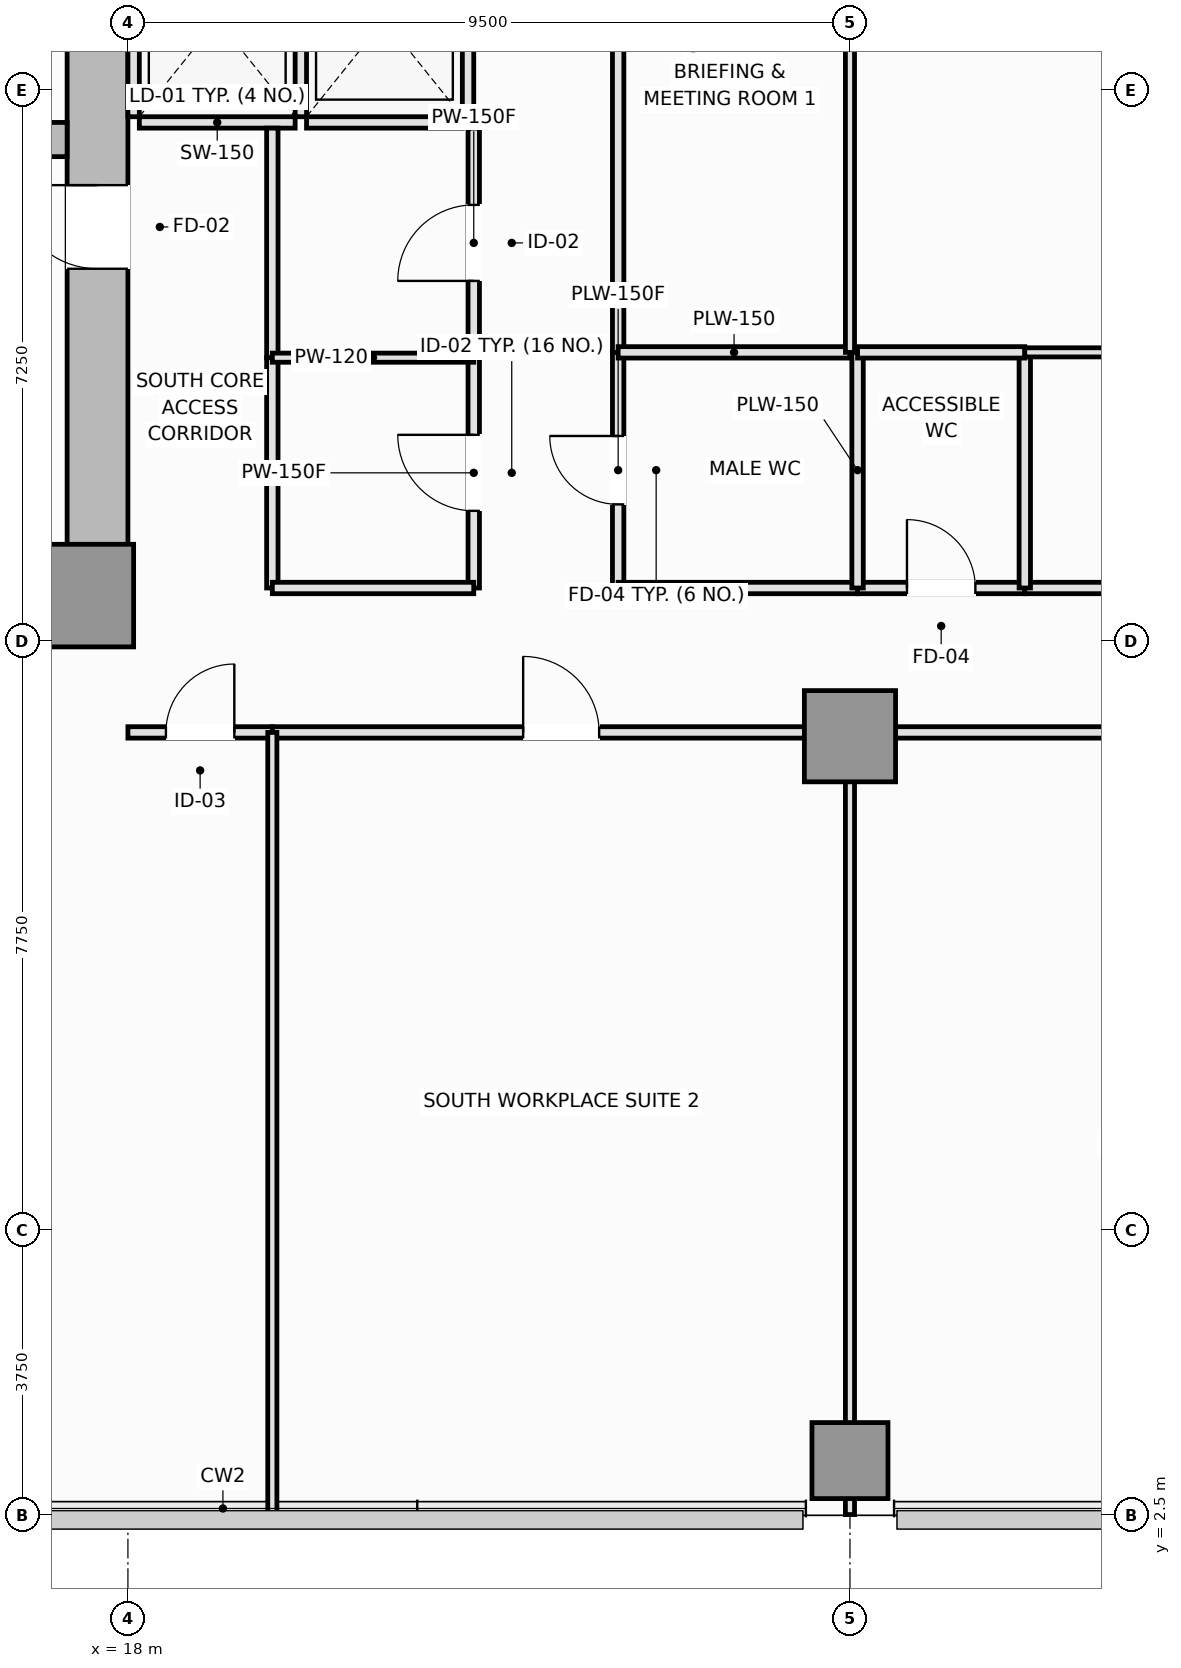
"""IFC4 building model, lengths in metres.
Left out: names, types, materials, properties, quantities, classifications, styles, units other than length and angle.
Written with IfcOpenShell. Run it as: python <this file> out.ifc"""

import sys

from ifc_helpers import new_model, si_unit, direction, frame, frame_2d, origin, origin_2d, place, context, subcontext, project, spatial, rectangle, extrude, element, fill, save


model = new_model("IFC4")
c1 = context("Model", 3, precision=1e-05, world=origin(), true_north=direction((0.0, 1.0)))
c2 = subcontext(c1, "Body", "Model", "MODEL_VIEW")
j1 = project(units=[si_unit("LENGTHUNIT", "METRE"), si_unit("PLANEANGLEUNIT", "RADIAN")], contexts=[c1])
p1 = place(None, origin())
s1 = spatial("IfcSite", under=j1, at=p1, CompositionType="ELEMENT")
p2 = place(p1, origin())
s2 = spatial("IfcBuilding", under=s1, at=p2, CompositionType="ELEMENT")
p3 = place(p2, frame((0.0, 0.0, 29.15)))
s3 = spatial("IfcBuildingStorey", under=s2, at=p3, CompositionType="ELEMENT", Elevation=29.15)
p4 = place(p3, frame((4.5, 14.4, 0.0), z_axis=(0.0, 0.0, 1.0), x_axis=(1.0, 0.0, 0.0)))
e1 = element("IfcWall", 1, at=p4, inside=s3, PredefinedType="SHEAR", context=c2, shape_type="SweptSolid", body=[
    extrude(rectangle(XDim=13.5, YDim=0.8, at=frame_2d((6.75, 0.0))), origin(), (0.0, 0.0, 1.0), 3.55),
])
p5 = place(p3, frame((17.6, 14.8, 0.0), z_axis=(0.0, 0.0, 1.0), x_axis=(0.0, 1.0, 0.0)))
e2 = element("IfcWall", 2, at=p5, inside=s3, PredefinedType="SHEAR", context=c2, shape_type="SweptSolid", body=[
    extrude(rectangle(XDim=8.65, YDim=0.8, at=frame_2d((4.325, 0.0))), origin(), (0.0, 0.0, 1.0), 3.55),
])
p6 = place(p5, frame((4.1, 0.0, 0.0)))
e3 = element("IfcOpeningElement", 3, at=p6, cuts=e2, PredefinedType="OPENING", context=c2, shape_type="SweptSolid", body=[
    extrude(rectangle(XDim=1.1, YDim=2.15, at=frame_2d((0.55, 1.075))), frame((0.0, 0.41, 0.0), z_axis=(0.0, -1.0, 0.0), x_axis=(1.0, 0.0, 0.0)), (0.0, 0.0, 1.0), 0.82),
])
p7 = place(p3, frame((5.3, 20.6, 0.0), z_axis=(0.0, 0.0, 1.0), x_axis=(1.0, 0.0, 0.0)))
e4 = element("IfcWall", 4, at=p7, inside=s3, PredefinedType="SHEAR", context=c2, shape_type="SweptSolid", body=[
    extrude(rectangle(XDim=11.9, YDim=0.45, at=frame_2d((5.95, 0.0))), origin(), (0.0, 0.0, 1.0), 3.55),
])
p8 = place(p3, frame((17.4, 14.6, 0.0), z_axis=(0.0, 0.0, 1.0), x_axis=(1.0, 0.0, 0.0)))
e5 = element("IfcColumn", 5, at=p8, inside=s3, PredefinedType="PILASTER", context=c2, shape_type="SweptSolid", body=[
    extrude(rectangle(XDim=1.35, YDim=1.35, at=origin_2d()), origin(), (0.0, 0.0, 1.0), 3.55),
])
p9 = place(p3, frame((27.5, 12.75, 0.0), z_axis=(0.0, 0.0, 1.0), x_axis=(1.0, 0.0, 0.0)))
e6 = element("IfcColumn", 6, at=p9, inside=s3, PredefinedType="COLUMN", context=c2, shape_type="SweptSolid", body=[
    extrude(rectangle(XDim=1.2, YDim=1.2, at=origin_2d()), origin(), (0.0, 0.0, 1.0), 3.55),
])
p10 = place(p3, frame((27.5, 3.22, 0.0), z_axis=(0.0, 0.0, 1.0), x_axis=(1.0, 0.0, 0.0)))
e7 = element("IfcColumn", 7, at=p10, inside=s3, PredefinedType="COLUMN", context=c2, shape_type="SweptSolid", body=[
    extrude(rectangle(XDim=1.0, YDim=1.0, at=origin_2d()), origin(), (0.0, 0.0, 1.0), 3.55),
])
p11 = place(p3, frame((18.15, 20.825, 0.0), z_axis=(0.0, 0.0, 1.0), x_axis=(1.0, 0.0, 0.0)))
e8 = element("IfcWall", 8, at=p11, inside=s3, PredefinedType="PARTITIONING", context=c2, shape_type="SweptSolid", body=[
    extrude(rectangle(XDim=2.05, YDim=0.15, at=frame_2d((1.025, 0.0))), origin(), (0.0, 0.0, 1.0), 3.37),
])
for number, where, z_axis, x_axis in (
    (9, (18.075, 20.9, 0.0), (0.0, 0.0, 1.0), (0.0, 1.0, 0.0)),
    (10, (20.275, 20.9, 0.0), (0.0, 0.0, 1.0), (0.0, 1.0, 0.0)),
):
    element("IfcWall", number, at=place(p3, frame(where, z_axis=z_axis, x_axis=x_axis)), inside=s3, PredefinedType="PARTITIONING", context=c2, shape_type="SweptSolid", body=[
        extrude(rectangle(XDim=2.55, YDim=0.15, at=frame_2d((1.275, 0.0))), origin(), (0.0, 0.0, 1.0), 3.37),
    ])
p12 = place(p3, frame((20.35, 20.825, 0.0), z_axis=(0.0, 0.0, 1.0), x_axis=(1.0, 0.0, 0.0)))
e11 = element("IfcWall", 11, at=p12, inside=s3, PredefinedType="PARTITIONING", context=c2, shape_type="SweptSolid", body=[
    extrude(rectangle(XDim=2.05, YDim=0.15, at=frame_2d((1.025, 0.0))), origin(), (0.0, 0.0, 1.0), 3.37),
])
p13 = place(p3, frame((22.475, 20.9, 0.0), z_axis=(0.0, 0.0, 1.0), x_axis=(0.0, 1.0, 0.0)))
e12 = element("IfcWall", 12, at=p13, inside=s3, PredefinedType="PARTITIONING", context=c2, shape_type="SweptSolid", body=[
    extrude(rectangle(XDim=2.55, YDim=0.15, at=frame_2d((1.275, 0.0))), origin(), (0.0, 0.0, 1.0), 3.37),
])
p14 = place(p3, frame((22.55, 14.7, 0.0), z_axis=(0.0, 0.0, 1.0), x_axis=(0.0, 1.0, 0.0)))
e13 = element("IfcWall", 13, at=p14, inside=s3, PredefinedType="PARTITIONING", context=c2, shape_type="SweptSolid", body=[
    extrude(rectangle(XDim=3.03, YDim=0.15, at=frame_2d((1.515, 0.0))), origin(), (0.0, 0.0, 1.0), 3.01),
])
p15 = place(p14, frame((1.015, 0.0, 0.0)))
e14 = element("IfcOpeningElement", 14, at=p15, cuts=e13, PredefinedType="OPENING", context=c2, shape_type="SweptSolid", body=[
    extrude(rectangle(XDim=1.0, YDim=2.15, at=frame_2d((0.5, 1.075))), frame((0.0, 0.085, 0.0), z_axis=(0.0, -1.0, 0.0), x_axis=(1.0, 0.0, 0.0)), (0.0, 0.0, 1.0), 0.17),
])
p16 = place(p3, frame((22.55, 17.73, 0.0), z_axis=(0.0, 0.0, 1.0), x_axis=(0.0, 1.0, 0.0)))
e15 = element("IfcWall", 15, at=p16, inside=s3, PredefinedType="PARTITIONING", context=c2, shape_type="SweptSolid", body=[
    extrude(rectangle(XDim=3.02, YDim=0.15, at=frame_2d((1.51, 0.0))), origin(), (0.0, 0.0, 1.0), 3.01),
])
p17 = place(p16, frame((1.01, 0.0, 0.0)))
e16 = element("IfcOpeningElement", 16, at=p17, cuts=e15, PredefinedType="OPENING", context=c2, shape_type="SweptSolid", body=[
    extrude(rectangle(XDim=1.0, YDim=2.15, at=frame_2d((0.5, 1.075))), frame((0.0, 0.085, 0.0), z_axis=(0.0, -1.0, 0.0), x_axis=(1.0, 0.0, 0.0)), (0.0, 0.0, 1.0), 0.17),
])
p18 = place(p3, frame((24.45, 14.7, 0.0), z_axis=(0.0, 0.0, 1.0), x_axis=(0.0, 1.0, 0.0)))
e17 = element("IfcWall", 17, at=p18, inside=s3, PredefinedType="PLUMBINGWALL", context=c2, shape_type="SweptSolid", body=[
    extrude(rectangle(XDim=3.1, YDim=0.15, at=frame_2d((1.55, 0.0))), origin(), (0.0, 0.0, 1.0), 3.37),
])
p19 = place(p18, frame((1.1, 0.0, 0.0)))
e18 = element("IfcOpeningElement", 18, at=p19, cuts=e17, PredefinedType="OPENING", context=c2, shape_type="SweptSolid", body=[
    extrude(rectangle(XDim=0.9, YDim=2.1, at=frame_2d((0.45, 1.05))), frame((0.0, 0.085, 0.0), z_axis=(0.0, -1.0, 0.0), x_axis=(1.0, 0.0, 0.0)), (0.0, 0.0, 1.0), 0.17),
])
p20 = place(p3, frame((24.45, 17.8, 0.0), z_axis=(0.0, 0.0, 1.0), x_axis=(0.0, 1.0, 0.0)))
e19 = element("IfcWall", 19, at=p20, inside=s3, PredefinedType="PARTITIONING", context=c2, shape_type="SweptSolid", body=[
    extrude(rectangle(XDim=14.9, YDim=0.15, at=frame_2d((7.45, 0.0))), origin(), (0.0, 0.0, 1.0), 3.37),
])
p21 = place(p20, frame((6.95, 0.0, 0.0)))
e20 = element("IfcOpeningElement", 20, at=p21, cuts=e19, PredefinedType="OPENING", context=c2, shape_type="SweptSolid", body=[
    extrude(rectangle(XDim=1.0, YDim=2.15, at=frame_2d((0.5, 1.075))), frame((0.0, 0.085, 0.0), z_axis=(0.0, -1.0, 0.0), x_axis=(1.0, 0.0, 0.0)), (0.0, 0.0, 1.0), 0.17),
])
p22 = place(p3, frame((19.9, 14.7, 0.0), z_axis=(0.0, 0.0, 1.0), x_axis=(0.0, 1.0, 0.0)))
e21 = element("IfcWall", 21, at=p22, inside=s3, PredefinedType="PARTITIONING", context=c2, shape_type="SweptSolid", body=[
    extrude(rectangle(XDim=3.03, YDim=0.15, at=frame_2d((1.515, 0.0))), origin(), (0.0, 0.0, 1.0), 3.37),
])
p23 = place(p3, frame((19.9, 17.73, 0.0), z_axis=(0.0, 0.0, 1.0), x_axis=(0.0, 1.0, 0.0)))
e22 = element("IfcWall", 22, at=p23, inside=s3, PredefinedType="PARTITIONING", context=c2, shape_type="SweptSolid", body=[
    extrude(rectangle(XDim=3.02, YDim=0.15, at=frame_2d((1.51, 0.0))), origin(), (0.0, 0.0, 1.0), 3.37),
])
p24 = place(p3, frame((19.9, 14.7, 0.0), z_axis=(0.0, 0.0, 1.0), x_axis=(1.0, 0.0, 0.0)))
e23 = element("IfcWall", 23, at=p24, inside=s3, PredefinedType="PARTITIONING", context=c2, shape_type="SweptSolid", body=[
    extrude(rectangle(XDim=2.65, YDim=0.15, at=frame_2d((1.325, 0.0))), origin(), (0.0, 0.0, 1.0), 3.37),
])
p25 = place(p3, frame((24.45, 14.7, 0.0), z_axis=(0.0, 0.0, 1.0), x_axis=(1.0, 0.0, 0.0)))
e24 = element("IfcWall", 24, at=p25, inside=s3, PredefinedType="PLUMBINGWALL", context=c2, shape_type="SweptSolid", body=[
    extrude(rectangle(XDim=3.15, YDim=0.15, at=frame_2d((1.575, 0.0))), origin(), (0.0, 0.0, 1.0), 3.37),
])
p26 = place(p3, frame((27.6, 14.7, 0.0), z_axis=(0.0, 0.0, 1.0), x_axis=(1.0, 0.0, 0.0)))
e25 = element("IfcWall", 25, at=p26, inside=s3, PredefinedType="PLUMBINGWALL", context=c2, shape_type="SweptSolid", body=[
    extrude(rectangle(XDim=2.2, YDim=0.15, at=frame_2d((1.1, 0.0))), origin(), (0.0, 0.0, 1.0), 3.37),
])
p27 = place(p26, frame((0.65, 0.0, 0.0)))
e26 = element("IfcOpeningElement", 26, at=p27, cuts=e25, PredefinedType="OPENING", context=c2, shape_type="SweptSolid", body=[
    extrude(rectangle(XDim=0.9, YDim=2.1, at=frame_2d((0.45, 1.05))), frame((0.0, 0.085, 0.0), z_axis=(0.0, -1.0, 0.0), x_axis=(1.0, 0.0, 0.0)), (0.0, 0.0, 1.0), 0.17),
])
p28 = place(p3, frame((29.8, 14.7, 0.0), z_axis=(0.0, 0.0, 1.0), x_axis=(1.0, 0.0, 0.0)))
e27 = element("IfcWall", 27, at=p28, inside=s3, PredefinedType="PARTITIONING", context=c2, shape_type="SweptSolid", body=[
    extrude(rectangle(XDim=6.5, YDim=0.15, at=frame_2d((3.25, 0.0))), origin(), (0.0, 0.0, 1.0), 3.37),
])
p29 = place(p3, frame((18.0, 12.8, 0.0), z_axis=(0.0, 0.0, 1.0), x_axis=(1.0, 0.0, 0.0)))
e28 = element("IfcWall", 28, at=p29, inside=s3, PredefinedType="PARTITIONING", context=c2, shape_type="SweptSolid", body=[
    extrude(rectangle(XDim=1.9, YDim=0.15, at=frame_2d((0.95, 0.0))), origin(), (0.0, 0.0, 1.0), 2.72),
])
p30 = place(p29, frame((0.5, 0.0, 0.0)))
e29 = element("IfcOpeningElement", 29, at=p30, cuts=e28, PredefinedType="OPENING", context=c2, shape_type="SweptSolid", body=[
    extrude(rectangle(XDim=0.9, YDim=2.1, at=frame_2d((0.45, 1.05))), frame((0.0, 0.085, 0.0), z_axis=(0.0, -1.0, 0.0), x_axis=(1.0, 0.0, 0.0)), (0.0, 0.0, 1.0), 0.17),
])
p31 = place(p3, frame((19.9, 12.8, 0.0), z_axis=(0.0, 0.0, 1.0), x_axis=(1.0, 0.0, 0.0)))
e30 = element("IfcWall", 30, at=p31, inside=s3, PredefinedType="PARTITIONING", context=c2, shape_type="SweptSolid", body=[
    extrude(rectangle(XDim=7.6, YDim=0.15, at=frame_2d((3.8, 0.0))), origin(), (0.0, 0.0, 1.0), 2.72),
])
p32 = place(p31, frame((3.3, 0.0, 0.0)))
e31 = element("IfcOpeningElement", 31, at=p32, cuts=e30, PredefinedType="OPENING", context=c2, shape_type="SweptSolid", body=[
    extrude(rectangle(XDim=1.0, YDim=2.15, at=frame_2d((0.5, 1.075))), frame((0.0, 0.085, 0.0), z_axis=(0.0, -1.0, 0.0), x_axis=(1.0, 0.0, 0.0)), (0.0, 0.0, 1.0), 0.17),
])
p33 = place(p3, frame((27.5, 12.8, 0.0), z_axis=(0.0, 0.0, 1.0), x_axis=(1.0, 0.0, 0.0)))
e32 = element("IfcWall", 32, at=p33, inside=s3, PredefinedType="PARTITIONING", context=c2, shape_type="SweptSolid", body=[
    extrude(rectangle(XDim=10.7, YDim=0.15, at=frame_2d((5.35, 0.0))), origin(), (0.0, 0.0, 1.0), 2.72),
])
p34 = place(p33, frame((4.85, 0.0, 0.0)))
e33 = element("IfcOpeningElement", 33, at=p34, cuts=e32, PredefinedType="OPENING", context=c2, shape_type="SweptSolid", body=[
    extrude(rectangle(XDim=1.0, YDim=2.15, at=frame_2d((0.5, 1.075))), frame((0.0, 0.085, 0.0), z_axis=(0.0, -1.0, 0.0), x_axis=(1.0, 0.0, 0.0)), (0.0, 0.0, 1.0), 0.17),
])
p35 = place(p3, frame((19.9, 17.73, 0.0), z_axis=(0.0, 0.0, 1.0), x_axis=(1.0, 0.0, 0.0)))
e34 = element("IfcWall", 34, at=p35, inside=s3, PredefinedType="PARTITIONING", context=c2, shape_type="SweptSolid", body=[
    extrude(rectangle(XDim=2.65, YDim=0.12, at=frame_2d((1.325, 0.0))), origin(), (0.0, 0.0, 1.0), 3.37),
])
p36 = place(p3, frame((27.6, 14.7, 0.0), z_axis=(0.0, 0.0, 1.0), x_axis=(0.0, 1.0, 0.0)))
e35 = element("IfcWall", 35, at=p36, inside=s3, PredefinedType="PLUMBINGWALL", context=c2, shape_type="SweptSolid", body=[
    extrude(rectangle(XDim=3.1, YDim=0.15, at=frame_2d((1.55, 0.0))), origin(), (0.0, 0.0, 1.0), 3.37),
])
p37 = place(p3, frame((24.45, 17.8, 0.0), z_axis=(0.0, 0.0, 1.0), x_axis=(1.0, 0.0, 0.0)))
e36 = element("IfcWall", 36, at=p37, inside=s3, PredefinedType="PLUMBINGWALL", context=c2, shape_type="SweptSolid", body=[
    extrude(rectangle(XDim=3.05, YDim=0.15, at=frame_2d((1.525, 0.0))), origin(), (0.0, 0.0, 1.0), 3.37),
])
p38 = place(p3, frame((29.8, 14.7, 0.0), z_axis=(0.0, 0.0, 1.0), x_axis=(0.0, 1.0, 0.0)))
e37 = element("IfcWall", 37, at=p38, inside=s3, PredefinedType="PLUMBINGWALL", context=c2, shape_type="SweptSolid", body=[
    extrude(rectangle(XDim=3.1, YDim=0.15, at=frame_2d((1.55, 0.0))), origin(), (0.0, 0.0, 1.0), 3.37),
])
p39 = place(p3, frame((27.6, 17.8, 0.0), z_axis=(0.0, 0.0, 1.0), x_axis=(1.0, 0.0, 0.0)))
e38 = element("IfcWall", 38, at=p39, inside=s3, PredefinedType="PLUMBINGWALL", context=c2, shape_type="SweptSolid", body=[
    extrude(rectangle(XDim=2.2, YDim=0.15, at=frame_2d((1.1, 0.0))), origin(), (0.0, 0.0, 1.0), 3.37),
])
p40 = place(p3, frame((29.8, 17.8, 0.0), z_axis=(0.0, 0.0, 1.0), x_axis=(1.0, 0.0, 0.0)))
e39 = element("IfcWall", 39, at=p40, inside=s3, PredefinedType="PARTITIONING", context=c2, shape_type="SweptSolid", body=[
    extrude(rectangle(XDim=6.5, YDim=0.12, at=frame_2d((3.25, 0.0))), origin(), (0.0, 0.0, 1.0), 3.37),
])
p41 = place(p3, frame((27.5, 17.8, 0.0), z_axis=(0.0, 0.0, 1.0), x_axis=(0.0, 1.0, 0.0)))
e40 = element("IfcWall", 40, at=p41, inside=s3, PredefinedType="PARTITIONING", context=c2, shape_type="SweptSolid", body=[
    extrude(rectangle(XDim=14.9, YDim=0.12, at=frame_2d((7.45, 0.0))), origin(), (0.0, 0.0, 1.0), 3.37),
])
p42 = place(p3, frame((19.9, 2.51, 0.0), z_axis=(0.0, 0.0, 1.0), x_axis=(0.0, 1.0, 0.0)))
e41 = element("IfcWall", 41, at=p42, inside=s3, PredefinedType="PARTITIONING", context=c2, shape_type="SweptSolid", body=[
    extrude(rectangle(XDim=10.29, YDim=0.12, at=frame_2d((5.145, 0.0))), origin(), (0.0, 0.0, 1.0), 3.37),
])
p43 = place(p3, frame((27.5, 2.51, 0.0), z_axis=(0.0, 0.0, 1.0), x_axis=(0.0, 1.0, 0.0)))
e42 = element("IfcWall", 42, at=p43, inside=s3, PredefinedType="PARTITIONING", context=c2, shape_type="SweptSolid", body=[
    extrude(rectangle(XDim=10.29, YDim=0.12, at=frame_2d((5.145, 0.0))), origin(), (0.0, 0.0, 1.0), 2.82),
])
p44 = place(p6, origin())
e43 = element("IfcDoor", 43, at=p44, inside=s3, OperationType="SINGLE_SWING_RIGHT", PredefinedType="DOOR", context=c2, shape_type="SweptSolid", body=[
    extrude(rectangle(XDim=1.1, YDim=2.15, at=frame_2d((0.55, 1.075))), frame((0.0, 0.025, 0.0), z_axis=(0.0, -1.0, 0.0), x_axis=(1.0, 0.0, 0.0)), (0.0, 0.0, 1.0), 0.05),
])
fill(e3, e43)
p45 = place(p15, origin())
e44 = element("IfcDoor", 44, at=p45, inside=s3, OperationType="SINGLE_SWING_RIGHT", PredefinedType="DOOR", context=c2, shape_type="SweptSolid", body=[
    extrude(rectangle(XDim=1.0, YDim=2.15, at=frame_2d((0.5, 1.075))), frame((0.0, 0.025, 0.0), z_axis=(0.0, -1.0, 0.0), x_axis=(1.0, 0.0, 0.0)), (0.0, 0.0, 1.0), 0.05),
])
fill(e14, e44)
p46 = place(p17, origin())
e45 = element("IfcDoor", 45, at=p46, inside=s3, OperationType="SINGLE_SWING_LEFT", PredefinedType="DOOR", context=c2, shape_type="SweptSolid", body=[
    extrude(rectangle(XDim=1.0, YDim=2.15, at=frame_2d((0.5, 1.075))), frame((0.0, 0.025, 0.0), z_axis=(0.0, -1.0, 0.0), x_axis=(1.0, 0.0, 0.0)), (0.0, 0.0, 1.0), 0.05),
])
fill(e16, e45)
p47 = place(p19, origin())
e46 = element("IfcDoor", 46, at=p47, inside=s3, OperationType="SINGLE_SWING_RIGHT", PredefinedType="DOOR", context=c2, shape_type="SweptSolid", body=[
    extrude(rectangle(XDim=0.9, YDim=2.1, at=frame_2d((0.45, 1.05))), frame((0.0, 0.025, 0.0), z_axis=(0.0, -1.0, 0.0), x_axis=(1.0, 0.0, 0.0)), (0.0, 0.0, 1.0), 0.05),
])
fill(e18, e46)
p48 = place(p27, origin())
e47 = element("IfcDoor", 47, at=p48, inside=s3, OperationType="SINGLE_SWING_LEFT", PredefinedType="DOOR", context=c2, shape_type="SweptSolid", body=[
    extrude(rectangle(XDim=0.9, YDim=2.1, at=frame_2d((0.45, 1.05))), frame((0.0, 0.025, 0.0), z_axis=(0.0, -1.0, 0.0), x_axis=(1.0, 0.0, 0.0)), (0.0, 0.0, 1.0), 0.05),
])
fill(e26, e47)
p49 = place(p30, origin())
e48 = element("IfcDoor", 48, at=p49, inside=s3, OperationType="SINGLE_SWING_RIGHT", PredefinedType="DOOR", context=c2, shape_type="SweptSolid", body=[
    extrude(rectangle(XDim=0.9, YDim=2.1, at=frame_2d((0.45, 1.05))), frame((0.0, 0.025, 0.0), z_axis=(0.0, -1.0, 0.0), x_axis=(1.0, 0.0, 0.0)), (0.0, 0.0, 1.0), 0.05),
])
fill(e29, e48)
p50 = place(p32, origin())
e49 = element("IfcDoor", 49, at=p50, inside=s3, OperationType="SINGLE_SWING_LEFT", PredefinedType="DOOR", context=c2, shape_type="SweptSolid", body=[
    extrude(rectangle(XDim=1.0, YDim=2.15, at=frame_2d((0.5, 1.075))), frame((0.0, 0.025, 0.0), z_axis=(0.0, -1.0, 0.0), x_axis=(1.0, 0.0, 0.0)), (0.0, 0.0, 1.0), 0.05),
])
fill(e31, e49)
save(model, sys.argv[1])
